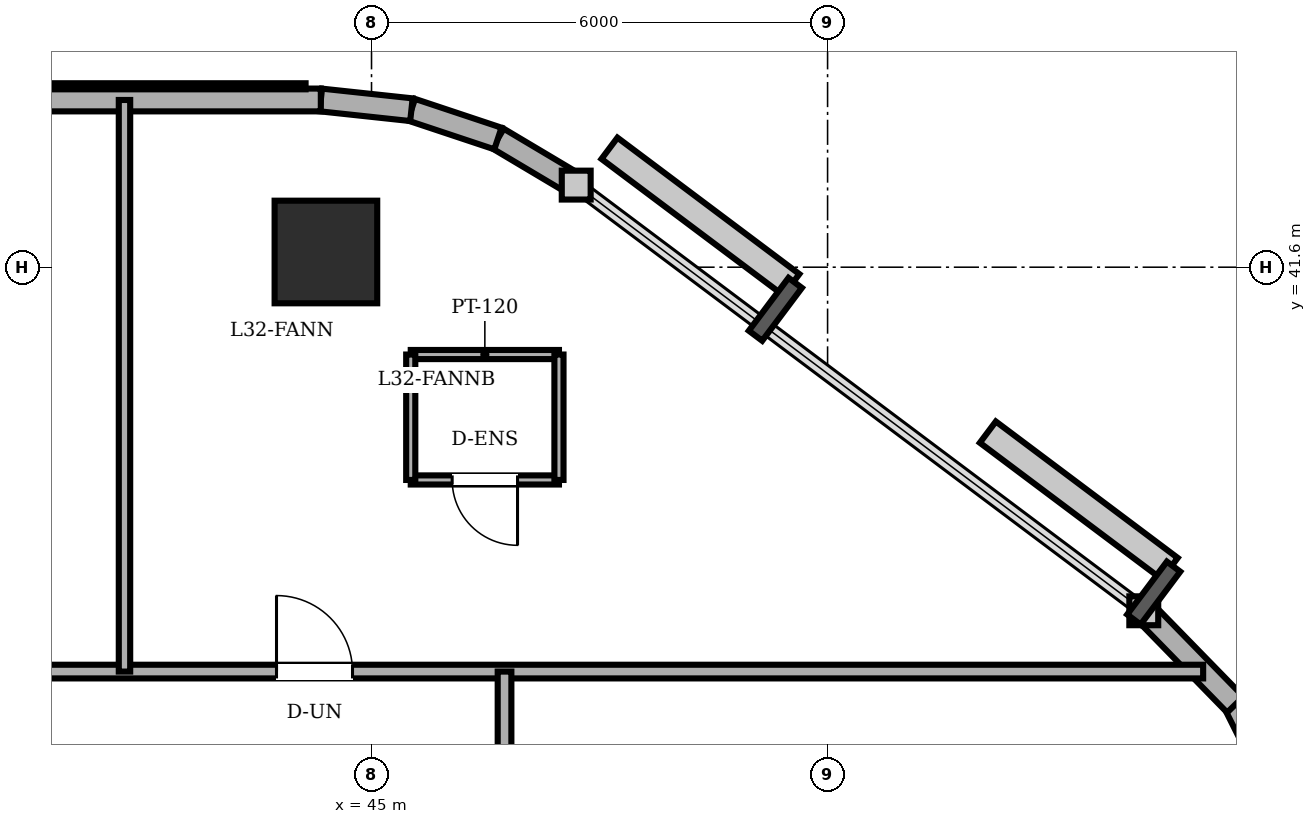
"""IFC4 building model, lengths in metres.
Left out: names, types, materials, properties, quantities, classifications, styles, units other than length and angle.
Written with IfcOpenShell. Run it as: python <this file> out.ifc"""

import sys

from ifc_helpers import new_model, si_unit, direction, frame, frame_2d, origin, origin_2d, place, context, subcontext, project, spatial, rectangle, circle, extrude, element, fill, save


model = new_model("IFC4")
c1 = context("Model", 3, precision=1e-05, world=origin(), true_north=direction((0.0, 1.0)))
c2 = subcontext(c1, "Body", "Model", "MODEL_VIEW")
j1 = project(units=[si_unit("LENGTHUNIT", "METRE"), si_unit("PLANEANGLEUNIT", "RADIAN")], contexts=[c1])
p1 = place(None, origin())
s1 = spatial("IfcSite", under=j1, at=p1, CompositionType="ELEMENT")
p2 = place(p1, origin())
s2 = spatial("IfcBuilding", under=s1, at=p2, CompositionType="ELEMENT")
p3 = place(p2, frame((0.0, 0.0, 122.3)))
s3 = spatial("IfcBuildingStorey", under=s2, at=p3, CompositionType="ELEMENT", Elevation=122.3)
p4 = place(p3, frame((44.4, 41.8, 0.0), z_axis=(0.0, 0.0, 1.0), x_axis=(1.0, 0.0, 0.0)))
e1 = element("IfcColumn", 1, at=p4, inside=s3, PredefinedType="COLUMN", context=c2, shape_type="SweptSolid", body=[
    extrude(circle(Radius=0.675, at=origin_2d()), origin(), (0.0, 0.0, 1.0), 3.6),
])
for number, where, z_axis, x_axis in (
    (2, (57.135, 34.304, 0.0), (0.0, 0.0, 1.0), (-0.447, 0.894, 0.0)),
    (3, (56.364, 35.846, 0.0), (0.0, 0.0, 1.0), (-0.698, 0.716, 0.0)),
):
    element("IfcWall", number, at=place(p3, frame(where, z_axis=z_axis, x_axis=x_axis)), inside=s3, PredefinedType="SOLIDWALL", context=c2, shape_type="SweptSolid", body=[
        extrude(rectangle(XDim=1.724, YDim=0.3, at=frame_2d((0.862, 0.0))), origin(), (0.0, 0.0, 1.0), 3.4),
    ])
p5 = place(p3, frame((47.693, 42.68, 0.0), z_axis=(0.0, 0.0, 1.0), x_axis=(-0.859320591642, 0.511437308749, 0.0)))
e4 = element("IfcWall", 4, at=p5, inside=s3, PredefinedType="SOLIDWALL", context=c2, shape_type="SweptSolid", body=[
    extrude(rectangle(XDim=1.199, YDim=0.3, at=frame_2d((0.599, 0.0))), origin(), (0.0, 0.0, 1.0), 3.4),
])
p6 = place(p3, frame((46.663, 43.293, 0.0), z_axis=(0.0, 0.0, 1.0), x_axis=(-0.948744332129, 0.316044604847, 0.0)))
e5 = element("IfcWall", 5, at=p6, inside=s3, PredefinedType="SOLIDWALL", context=c2, shape_type="SweptSolid", body=[
    extrude(rectangle(XDim=1.2, YDim=0.3, at=frame_2d((0.6, 0.0))), origin(), (0.0, 0.0, 1.0), 3.4),
])
p7 = place(p3, frame((45.525, 43.672, 0.0), z_axis=(0.0, 0.0, 1.0), x_axis=(-0.994289103787, 0.106720092254, 0.0)))
e6 = element("IfcWall", 6, at=p7, inside=s3, PredefinedType="SOLIDWALL", context=c2, shape_type="SweptSolid", body=[
    extrude(rectangle(XDim=1.199, YDim=0.3, at=frame_2d((0.599, 0.0))), origin(), (0.0, 0.0, 1.0), 3.4),
])
p8 = place(p3, frame((44.333, 43.8, 0.0), z_axis=(0.0, 0.0, 1.0), x_axis=(-1.0, 0.0, 0.0)))
e7 = element("IfcWall", 7, at=p8, inside=s3, PredefinedType="SOLIDWALL", context=c2, shape_type="SweptSolid", body=[
    extrude(rectangle(XDim=29.933, YDim=0.3, at=frame_2d((14.967, 0.0))), origin(), (0.0, 0.0, 1.0), 3.4),
])
p9 = place(p8, frame((14.758, 0.0, 0.0)))
e8 = element("IfcOpeningElement", 8, at=p9, cuts=e7, PredefinedType="OPENING", context=c2, shape_type="SweptSolid", body=[
    extrude(rectangle(XDim=0.95, YDim=2.2, at=frame_2d((0.475, 1.1))), frame((0.0, 0.16, 0.0), z_axis=(0.0, -1.0, 0.0), x_axis=(1.0, 0.0, 0.0)), (0.0, 0.0, 1.0), 0.32),
])
p10 = place(p8, frame((5.075, 0.0, 0.85)))
e9 = element("IfcOpeningElement", 9, at=p10, cuts=e7, PredefinedType="OPENING", context=c2, shape_type="SweptSolid", body=[
    extrude(rectangle(XDim=1.65, YDim=1.55, at=frame_2d((0.825, 0.775))), frame((0.0, 0.16, 0.0), z_axis=(0.0, -1.0, 0.0), x_axis=(1.0, 0.0, 0.0)), (0.0, 0.0, 1.0), 0.32),
])
p11 = place(p8, frame((8.391, 0.0, 0.85)))
e10 = element("IfcOpeningElement", 10, at=p11, cuts=e7, PredefinedType="OPENING", context=c2, shape_type="SweptSolid", body=[
    extrude(rectangle(XDim=1.65, YDim=1.55, at=frame_2d((0.825, 0.775))), frame((0.0, 0.16, 0.0), z_axis=(0.0, -1.0, 0.0), x_axis=(1.0, 0.0, 0.0)), (0.0, 0.0, 1.0), 0.32),
])
p12 = place(p8, frame((16.508, 0.0, 0.85)))
e11 = element("IfcOpeningElement", 11, at=p12, cuts=e7, PredefinedType="OPENING", context=c2, shape_type="SweptSolid", body=[
    extrude(rectangle(XDim=1.65, YDim=1.55, at=frame_2d((0.825, 0.775))), frame((0.0, 0.16, 0.0), z_axis=(0.0, -1.0, 0.0), x_axis=(1.0, 0.0, 0.0)), (0.0, 0.0, 1.0), 0.32),
])
p13 = place(p8, frame((22.191, 0.0, 0.85)))
e12 = element("IfcOpeningElement", 12, at=p13, cuts=e7, PredefinedType="OPENING", context=c2, shape_type="SweptSolid", body=[
    extrude(rectangle(XDim=1.65, YDim=1.55, at=frame_2d((0.825, 0.775))), frame((0.0, 0.16, 0.0), z_axis=(0.0, -1.0, 0.0), x_axis=(1.0, 0.0, 0.0)), (0.0, 0.0, 1.0), 0.32),
])
p14 = place(p8, frame((25.475, 0.0, 0.85)))
e13 = element("IfcOpeningElement", 13, at=p14, cuts=e7, PredefinedType="OPENING", context=c2, shape_type="SweptSolid", body=[
    extrude(rectangle(XDim=1.65, YDim=1.55, at=frame_2d((0.825, 0.775))), frame((0.0, 0.16, 0.0), z_axis=(0.0, -1.0, 0.0), x_axis=(1.0, 0.0, 0.0)), (0.0, 0.0, 1.0), 0.32),
])
p15 = place(p3, frame((45.516, 40.451, 0.0), z_axis=(0.0, 0.0, 1.0), x_axis=(1.0, 0.0, 0.0)))
e14 = element("IfcWall", 14, at=p15, inside=s3, PredefinedType="PARTITIONING", context=c2, shape_type="SweptSolid", body=[
    extrude(rectangle(XDim=1.95, YDim=0.12, at=frame_2d((0.975, 0.0))), origin(), (0.0, 0.0, 1.0), 3.4),
])
p16 = place(p3, frame((47.466, 38.801, 0.0), z_axis=(0.0, 0.0, 1.0), x_axis=(-1.0, 0.0, 0.0)))
e15 = element("IfcWall", 15, at=p16, inside=s3, PredefinedType="PARTITIONING", context=c2, shape_type="SweptSolid", body=[
    extrude(rectangle(XDim=1.95, YDim=0.12, at=frame_2d((0.975, 0.0))), origin(), (0.0, 0.0, 1.0), 3.4),
])
p17 = place(p16, frame((0.545, 0.0, 0.0)))
e16 = element("IfcOpeningElement", 16, at=p17, cuts=e15, PredefinedType="OPENING", context=c2, shape_type="SweptSolid", body=[
    extrude(rectangle(XDim=0.86, YDim=2.1, at=frame_2d((0.43, 1.05))), frame((0.0, 0.07, 0.0), z_axis=(0.0, -1.0, 0.0), x_axis=(1.0, 0.0, 0.0)), (0.0, 0.0, 1.0), 0.14),
])
for number, where, z_axis, x_axis in (
    (17, (45.516, 40.451, 0.0), (0.0, 0.0, 1.0), (0.0, -1.0, 0.0)),
    (18, (47.466, 38.801, 0.0), (0.0, 0.0, 1.0), (0.0, 1.0, 0.0)),
):
    element("IfcWall", number, at=place(p3, frame(where, z_axis=z_axis, x_axis=x_axis)), inside=s3, PredefinedType="PARTITIONING", context=c2, shape_type="SweptSolid", body=[
        extrude(rectangle(XDim=1.65, YDim=0.12, at=frame_2d((0.825, 0.0))), origin(), (0.0, 0.0, 1.0), 3.4),
    ])
p18 = place(p3, frame((8.8, 36.28, 0.0), z_axis=(0.0, 0.0, 1.0), x_axis=(1.0, 0.0, 0.0)))
e19 = element("IfcWall", 19, at=p18, inside=s3, PredefinedType="PARTITIONING", context=c2, shape_type="SweptSolid", body=[
    extrude(rectangle(XDim=47.141, YDim=0.18, at=frame_2d((23.57, 0.0))), origin(), (0.0, 0.0, 1.0), 3.4),
])
p19 = place(p18, frame((17.05, 0.0, 0.0)))
e20 = element("IfcOpeningElement", 20, at=p19, cuts=e19, PredefinedType="OPENING", context=c2, shape_type="SweptSolid", body=[
    extrude(rectangle(XDim=0.9, YDim=2.1, at=frame_2d((0.45, 1.05))), frame((0.0, 0.1, 0.0), z_axis=(0.0, -1.0, 0.0), x_axis=(1.0, 0.0, 0.0)), (0.0, 0.0, 1.0), 0.2),
])
p20 = place(p18, frame((20.67, 0.0, 0.0)))
e21 = element("IfcOpeningElement", 21, at=p20, cuts=e19, PredefinedType="OPENING", context=c2, shape_type="SweptSolid", body=[
    extrude(rectangle(XDim=0.86, YDim=2.1, at=frame_2d((0.43, 1.05))), frame((0.0, 0.1, 0.0), z_axis=(0.0, -1.0, 0.0), x_axis=(1.0, 0.0, 0.0)), (0.0, 0.0, 1.0), 0.2),
])
p21 = place(p18, frame((34.95, 0.0, 0.0)))
e22 = element("IfcOpeningElement", 22, at=p21, cuts=e19, PredefinedType="OPENING", context=c2, shape_type="SweptSolid", body=[
    extrude(rectangle(XDim=1.0, YDim=2.15, at=frame_2d((0.5, 1.075))), frame((0.0, 0.1, 0.0), z_axis=(0.0, -1.0, 0.0), x_axis=(1.0, 0.0, 0.0)), (0.0, 0.0, 1.0), 0.2),
])
p22 = place(p18, frame((8.0, 0.0, 0.0)))
e23 = element("IfcOpeningElement", 23, at=p22, cuts=e19, PredefinedType="OPENING", context=c2, shape_type="SweptSolid", body=[
    extrude(rectangle(XDim=1.0, YDim=2.15, at=frame_2d((0.5, 1.075))), frame((0.0, 0.1, 0.0), z_axis=(0.0, -1.0, 0.0), x_axis=(1.0, 0.0, 0.0)), (0.0, 0.0, 1.0), 0.2),
])
p23 = place(p18, frame((27.515, 0.0, 0.0)))
e24 = element("IfcOpeningElement", 24, at=p23, cuts=e19, PredefinedType="OPENING", context=c2, shape_type="SweptSolid", body=[
    extrude(rectangle(XDim=0.92, YDim=2.1, at=frame_2d((0.46, 1.05))), frame((0.0, 0.1, 0.0), z_axis=(0.0, -1.0, 0.0), x_axis=(1.0, 0.0, 0.0)), (0.0, 0.0, 1.0), 0.2),
])
p24 = place(p3, frame((41.75, 36.28, 0.0), z_axis=(0.0, 0.0, 1.0), x_axis=(0.0, 1.0, 0.0)))
e25 = element("IfcWall", 25, at=p24, inside=s3, PredefinedType="PARTITIONING", context=c2, shape_type="SweptSolid", body=[
    extrude(rectangle(XDim=7.52, YDim=0.15, at=frame_2d((3.76, 0.0))), origin(), (0.0, 0.0, 1.0), 3.4),
])
p25 = place(p3, frame((46.75, 33.82, 0.0), z_axis=(0.0, 0.0, 1.0), x_axis=(0.0, 1.0, 0.0)))
e26 = element("IfcWall", 26, at=p25, inside=s3, PredefinedType="PARTITIONING", context=c2, shape_type="SweptSolid", body=[
    extrude(rectangle(XDim=2.46, YDim=0.18, at=frame_2d((1.23, 0.0))), origin(), (0.0, 0.0, 1.0), 2.882),
])
p26 = place(p17, origin())
e27 = element("IfcDoor", 27, at=p26, inside=s3, OperationType="SINGLE_SWING_LEFT", PredefinedType="DOOR", context=c2, shape_type="SweptSolid", body=[
    extrude(rectangle(XDim=0.86, YDim=2.1, at=frame_2d((0.43, 1.05))), frame((0.0, 0.025, 0.0), z_axis=(0.0, -1.0, 0.0), x_axis=(1.0, 0.0, 0.0)), (0.0, 0.0, 1.0), 0.05),
])
fill(e16, e27)
p27 = place(p21, origin())
e28 = element("IfcDoor", 28, at=p27, inside=s3, OperationType="SINGLE_SWING_LEFT", PredefinedType="DOOR", context=c2, shape_type="SweptSolid", body=[
    extrude(rectangle(XDim=1.0, YDim=2.15, at=frame_2d((0.5, 1.075))), frame((0.0, 0.025, 0.0), z_axis=(0.0, -1.0, 0.0), x_axis=(1.0, 0.0, 0.0)), (0.0, 0.0, 1.0), 0.05),
])
fill(e22, e28)
save(model, sys.argv[1])
